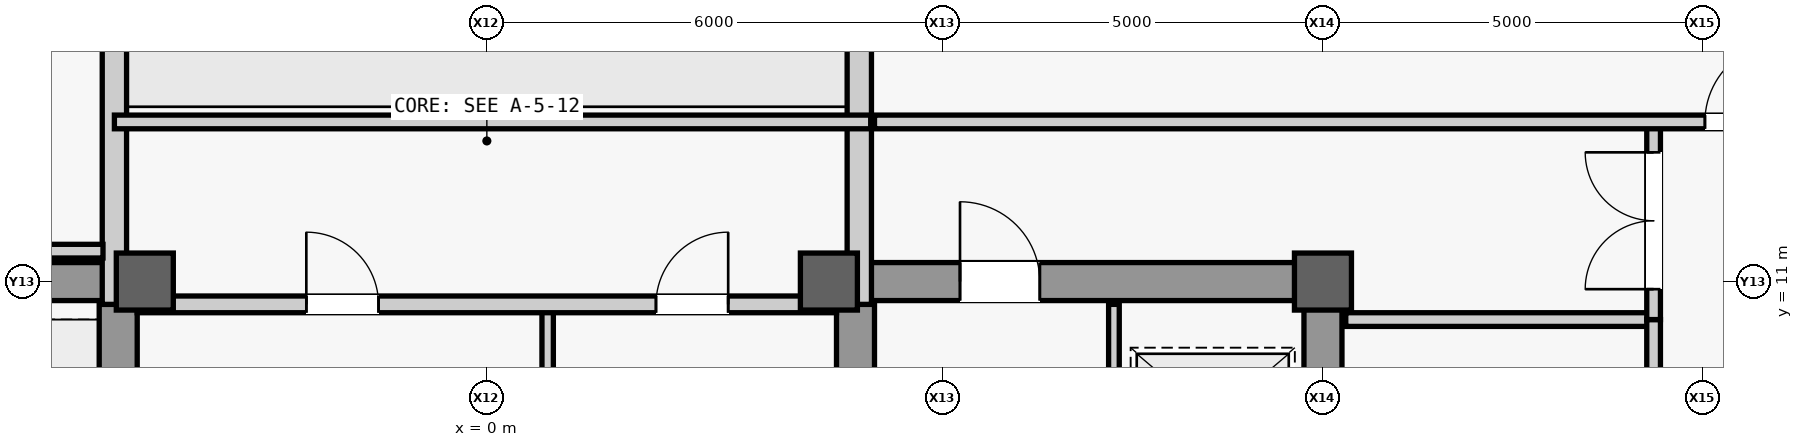
"""IFC4 building model, lengths in metres.
Left out: names, types, materials, properties, quantities, classifications, styles, units other than length and angle.
Written with IfcOpenShell. Run it as: python <this file> out.ifc"""

import sys

from ifc_helpers import new_model, si_unit, direction, frame, frame_2d, origin, origin_2d, place, context, subcontext, project, spatial, rectangle, extrude, source, transform, mapped, element, fill, save


model = new_model("IFC4")
c1 = context("Model", 3, precision=1e-05, world=origin(), true_north=direction((0.0, 1.0)))
c2 = subcontext(c1, "Body", "Model", "MODEL_VIEW")
j1 = project(units=[si_unit("LENGTHUNIT", "METRE"), si_unit("PLANEANGLEUNIT", "RADIAN")], contexts=[c1])
p1 = place(None, origin())
s1 = spatial("IfcSite", under=j1, at=p1, CompositionType="ELEMENT")
p2 = place(p1, origin())
s2 = spatial("IfcBuilding", under=s1, at=p2, CompositionType="ELEMENT")
p3 = place(p2, frame((0.0, 0.0, 346.3)))
s3 = spatial("IfcBuildingStorey", under=s2, at=p3, CompositionType="ELEMENT", Elevation=346.3)
m1 = source(origin(), c2, "Body", "SweptSolid", [
    extrude(rectangle(XDim=22.0, YDim=0.5, at=frame_2d((11.0, 0.0))), origin(), (0.0, 0.0, 1.0), 3.74),
])
p4 = place(p3, frame((11.0, -11.0, 0.0), z_axis=(0.0, 0.0, 1.0), x_axis=(0.0, 1.0, 0.0)))
e1 = element("IfcWall", 1, at=p4, inside=s3, PredefinedType="SHEAR", context=c2, shape_type="MappedRepresentation", body=[
    mapped(m1, transform((0.0, 0.0, 0.0), scale=1.0)),
])
m2 = source(origin(), c2, "Body", "SweptSolid", [
    extrude(rectangle(XDim=1.1, YDim=2.2, at=frame_2d((0.55, 1.1))), frame((0.0, 0.26, 0.0), z_axis=(0.0, -1.0, 0.0), x_axis=(1.0, 0.0, 0.0)), (0.0, 0.0, 1.0), 0.52),
])
p5 = place(p4, frame((0.8, 0.0, 0.0)))
e2 = element("IfcOpeningElement", 2, at=p5, cuts=e1, PredefinedType="OPENING", context=c2, shape_type="MappedRepresentation", body=[
    mapped(m2, transform((0.0, 0.0, 0.0), scale=1.0)),
])
m3 = source(origin(), c2, "Body", "SweptSolid", [
    extrude(rectangle(XDim=0.9, YDim=2.15, at=frame_2d((0.45, 1.075))), frame((0.0, 0.26, 0.0), z_axis=(0.0, -1.0, 0.0), x_axis=(1.0, 0.0, 0.0)), (0.0, 0.0, 1.0), 0.52),
])
p6 = place(p4, frame((6.2, 0.0, 0.0)))
e3 = element("IfcOpeningElement", 3, at=p6, cuts=e1, PredefinedType="OPENING", context=c2, shape_type="MappedRepresentation", body=[
    mapped(m3, transform((0.0, 0.0, 0.0), scale=1.0)),
])
p7 = place(p4, frame((8.05, 0.0, 0.0)))
e4 = element("IfcOpeningElement", 4, at=p7, cuts=e1, PredefinedType="OPENING", context=c2, shape_type="MappedRepresentation", body=[
    mapped(m3, transform((0.0, 0.0, 0.0), scale=1.0)),
])
m4 = source(origin(), c2, "Body", "SweptSolid", [
    extrude(rectangle(XDim=1.2, YDim=2.3, at=frame_2d((0.6, 1.15))), frame((0.0, 0.26, 0.0), z_axis=(0.0, -1.0, 0.0), x_axis=(1.0, 0.0, 0.0)), (0.0, 0.0, 1.0), 0.52),
])
p8 = place(p4, frame((17.6, 0.0, 0.0)))
e5 = element("IfcOpeningElement", 5, at=p8, cuts=e1, PredefinedType="OPENING", context=c2, shape_type="MappedRepresentation", body=[
    mapped(m4, transform((0.0, 0.0, 0.0), scale=1.0)),
])
p9 = place(p4, frame((19.6, 0.0, 0.0)))
e6 = element("IfcOpeningElement", 6, at=p9, cuts=e1, PredefinedType="OPENING", context=c2, shape_type="MappedRepresentation", body=[
    mapped(m4, transform((0.0, 0.0, 0.0), scale=1.0)),
])
m5 = source(origin(), c2, "Body", "SweptSolid", [
    extrude(rectangle(XDim=1.3, YDim=2.3, at=frame_2d((0.65, 1.15))), frame((0.0, 0.26, 0.0), z_axis=(0.0, -1.0, 0.0), x_axis=(1.0, 0.0, 0.0)), (0.0, 0.0, 1.0), 0.52),
])
p10 = place(p4, frame((2.7, 0.0, 0.0)))
e7 = element("IfcOpeningElement", 7, at=p10, cuts=e1, PredefinedType="OPENING", context=c2, shape_type="MappedRepresentation", body=[
    mapped(m5, transform((0.0, 0.0, 0.0), scale=1.0)),
])
p11 = place(p4, frame((13.35, 0.0, 0.0)))
e8 = element("IfcOpeningElement", 8, at=p11, cuts=e1, PredefinedType="OPENING", context=c2, shape_type="MappedRepresentation", body=[
    mapped(m5, transform((0.0, 0.0, 0.0), scale=1.0)),
])
m6 = source(origin(), c2, "Body", "SweptSolid", [
    extrude(rectangle(XDim=21.4, YDim=0.5, at=frame_2d((10.7, 0.0))), origin(), (0.0, 0.0, 1.0), 3.74),
])
for number, where, z_axis, x_axis in (
    (9, (-4.85, -10.7, 0.0), (0.0, 0.0, 1.0), (0.0, 1.0, 0.0)),
    (10, (4.85, -10.7, 0.0), (0.0, 0.0, 1.0), (0.0, 1.0, 0.0)),
):
    element("IfcWall", number, at=place(p3, frame(where, z_axis=z_axis, x_axis=x_axis)), inside=s3, PredefinedType="SHEAR", context=c2, shape_type="MappedRepresentation", body=[
        mapped(m6, transform((0.0, 0.0, 0.0), scale=1.0)),
    ])
m7 = source(origin(), c2, "Body", "SweptSolid", [
    extrude(rectangle(XDim=5.9, YDim=0.5, at=frame_2d((2.95, 0.0))), origin(), (0.0, 0.0, 1.0), 3.74),
])
p12 = place(p3, frame((-10.75, 11.0, 0.0), z_axis=(0.0, 0.0, 1.0), x_axis=(1.0, 0.0, 0.0)))
e11 = element("IfcWall", 11, at=p12, inside=s3, PredefinedType="SHEAR", context=c2, shape_type="MappedRepresentation", body=[
    mapped(m7, transform((0.0, 0.0, 0.0), scale=1.0)),
])
p13 = place(p3, frame((4.85, 11.0, 0.0), z_axis=(0.0, 0.0, 1.0), x_axis=(1.0, 0.0, 0.0)))
e12 = element("IfcWall", 12, at=p13, inside=s3, PredefinedType="SHEAR", context=c2, shape_type="MappedRepresentation", body=[
    mapped(m7, transform((0.0, 0.0, 0.0), scale=1.0)),
])
m8 = source(origin(), c2, "Body", "SweptSolid", [
    extrude(rectangle(XDim=1.05, YDim=2.2, at=frame_2d((0.525, 1.1))), frame((0.0, 0.26, 0.0), z_axis=(0.0, -1.0, 0.0), x_axis=(1.0, 0.0, 0.0)), (0.0, 0.0, 1.0), 0.52),
])
p14 = place(p13, frame((1.375, 0.0, 0.0)))
e13 = element("IfcOpeningElement", 13, at=p14, cuts=e12, PredefinedType="OPENING", context=c2, shape_type="MappedRepresentation", body=[
    mapped(m8, transform((0.0, 0.0, 0.0), scale=1.0)),
])
m9 = source(origin(), c2, "Body", "SweptSolid", [
    extrude(rectangle(XDim=0.75, YDim=0.75, at=origin_2d()), origin(), (0.0, 0.0, 1.0), 4.0),
])
for number, where, z_axis, x_axis in (
    (14, (-4.5, 11.0, 0.0), (0.0, 0.0, 1.0), (1.0, 0.0, 0.0)),
    (15, (4.5, 11.0, 0.0), (0.0, 0.0, 1.0), (1.0, 0.0, 0.0)),
    (16, (11.0, 11.0, 0.0), (0.0, 0.0, 1.0), (1.0, 0.0, 0.0)),
):
    element("IfcColumn", number, at=place(p3, frame(where, z_axis=z_axis, x_axis=x_axis)), inside=s3, PredefinedType="COLUMN", context=c2, shape_type="MappedRepresentation", body=[
        mapped(m9, transform((0.0, 0.0, 0.0), scale=1.0)),
    ])
m10 = source(origin(), c2, "Body", "SweptSolid", [
    extrude(rectangle(XDim=14.98, YDim=0.32, at=frame_2d((7.49, 0.0))), origin(), (0.0, 0.0, 1.0), 3.045),
])
for number, where, z_axis, x_axis in (
    (17, (-4.9, 10.7, 0.0), (0.0, 0.0, 1.0), (0.0, 1.0, 0.0)),
    (18, (4.9, 10.7, 0.0), (0.0, 0.0, 1.0), (0.0, 1.0, 0.0)),
):
    element("IfcWall", number, at=place(p3, frame(where, z_axis=z_axis, x_axis=x_axis)), inside=s3, PredefinedType="STANDARD", context=c2, shape_type="MappedRepresentation", body=[
        mapped(m10, transform((0.0, 0.0, 0.0), scale=1.0)),
    ])
m11 = source(origin(), c2, "Body", "SweptSolid", [
    extrude(rectangle(XDim=9.4, YDim=0.14, at=frame_2d((4.7, 0.0))), origin(), (0.0, 0.0, 1.0), 3.74),
])
p15 = place(p3, frame((8.25, 1.3, 0.0), z_axis=(0.0, 0.0, 1.0), x_axis=(0.0, 1.0, 0.0)))
e19 = element("IfcWall", 19, at=p15, inside=s3, PredefinedType="PARTITIONING", context=c2, shape_type="MappedRepresentation", body=[
    mapped(m11, transform((0.0, 0.0, 0.0), scale=1.0)),
])
m12 = source(origin(), c2, "Body", "SweptSolid", [
    extrude(rectangle(XDim=4.05, YDim=0.18, at=frame_2d((2.025, 0.0))), origin(), (0.0, 0.0, 1.0), 3.74),
])
p16 = place(p3, frame((11.3, 10.5, 0.0), z_axis=(0.0, 0.0, 1.0), x_axis=(1.0, 0.0, 0.0)))
e20 = element("IfcWall", 20, at=p16, inside=s3, PredefinedType="PARTITIONING", context=c2, shape_type="MappedRepresentation", body=[
    mapped(m12, transform((0.0, 0.0, 0.0), scale=1.0)),
])
m13 = source(origin(), c2, "Body", "SweptSolid", [
    extrude(rectangle(XDim=16.6, YDim=0.18, at=frame_2d((8.3, 0.0))), origin(), (0.0, 0.0, 1.0), 3.74),
])
p17 = place(p3, frame((15.35, -6.1, 0.0), z_axis=(0.0, 0.0, 1.0), x_axis=(0.0, 1.0, 0.0)))
e21 = element("IfcWall", 21, at=p17, inside=s3, PredefinedType="PARTITIONING", context=c2, shape_type="MappedRepresentation", body=[
    mapped(m13, transform((0.0, 0.0, 0.0), scale=1.0)),
])
m14 = source(origin(), c2, "Body", "SweptSolid", [
    extrude(rectangle(XDim=1.8, YDim=2.25, at=frame_2d((0.9, 1.125))), frame((0.0, 0.1, 0.0), z_axis=(0.0, -1.0, 0.0), x_axis=(1.0, 0.0, 0.0)), (0.0, 0.0, 1.0), 0.2),
])
p18 = place(p17, frame((2.7, 0.0, 0.0)))
e22 = element("IfcOpeningElement", 22, at=p18, cuts=e21, PredefinedType="OPENING", context=c2, shape_type="MappedRepresentation", body=[
    mapped(m14, transform((0.0, 0.0, 0.0), scale=1.0)),
])
p19 = place(p17, frame((13.0, 0.0, 0.0)))
e23 = element("IfcOpeningElement", 23, at=p19, cuts=e21, PredefinedType="OPENING", context=c2, shape_type="MappedRepresentation", body=[
    mapped(m14, transform((0.0, 0.0, 0.0), scale=1.0)),
])
m15 = source(origin(), c2, "Body", "SweptSolid", [
    extrude(rectangle(XDim=5.4, YDim=0.15, at=frame_2d((2.7, 0.0))), origin(), (0.0, 0.0, 1.0), 3.74),
])
p20 = place(p3, frame((0.8, 5.3, 0.0), z_axis=(0.0, 0.0, 1.0), x_axis=(0.0, 1.0, 0.0)))
e24 = element("IfcWall", 24, at=p20, inside=s3, PredefinedType="PARTITIONING", context=c2, shape_type="MappedRepresentation", body=[
    mapped(m15, transform((0.0, 0.0, 0.0), scale=1.0)),
])
m16 = source(origin(), c2, "Body", "SweptSolid", [
    extrude(rectangle(XDim=9.2, YDim=0.22, at=frame_2d((4.6, 0.0))), origin(), (0.0, 0.0, 1.0), 3.74),
])
p21 = place(p3, frame((-4.6, 10.7, 0.0), z_axis=(0.0, 0.0, 1.0), x_axis=(1.0, 0.0, 0.0)))
e25 = element("IfcWall", 25, at=p21, inside=s3, PredefinedType="PARTITIONING", context=c2, shape_type="MappedRepresentation", body=[
    mapped(m16, transform((0.0, 0.0, 0.0), scale=1.0)),
])
m17 = source(origin(), c2, "Body", "SweptSolid", [
    extrude(rectangle(XDim=0.95, YDim=2.15, at=frame_2d((0.475, 1.075))), frame((0.0, 0.12, 0.0), z_axis=(0.0, -1.0, 0.0), x_axis=(1.0, 0.0, 0.0)), (0.0, 0.0, 1.0), 0.24),
])
p22 = place(p21, frame((2.225, 0.0, 0.0)))
e26 = element("IfcOpeningElement", 26, at=p22, cuts=e25, PredefinedType="OPENING", context=c2, shape_type="MappedRepresentation", body=[
    mapped(m17, transform((0.0, 0.0, 0.0), scale=1.0)),
])
p23 = place(p21, frame((6.825, 0.0, 0.0)))
e27 = element("IfcOpeningElement", 27, at=p23, cuts=e25, PredefinedType="OPENING", context=c2, shape_type="MappedRepresentation", body=[
    mapped(m17, transform((0.0, 0.0, 0.0), scale=1.0)),
])
m18 = source(origin(), c2, "Body", "SweptSolid", [
    extrude(rectangle(XDim=9.95, YDim=0.18, at=frame_2d((4.975, 0.0))), origin(), (0.0, 0.0, 1.0), 3.74),
])
p24 = place(p3, frame((-4.9, 13.1, 0.0), z_axis=(0.0, 0.0, 1.0), x_axis=(1.0, 0.0, 0.0)))
e28 = element("IfcWall", 28, at=p24, inside=s3, PredefinedType="PARTITIONING", context=c2, shape_type="MappedRepresentation", body=[
    mapped(m18, transform((0.0, 0.0, 0.0), scale=1.0)),
])
m19 = source(origin(), c2, "Body", "SweptSolid", [
    extrude(rectangle(XDim=2.6, YDim=0.18, at=frame_2d((1.3, 0.0))), origin(), (0.0, 0.0, 1.0), 3.74),
])
p25 = place(p3, frame((15.35, 10.5, 0.0), z_axis=(0.0, 0.0, 1.0), x_axis=(0.0, 1.0, 0.0)))
e29 = element("IfcWall", 29, at=p25, inside=s3, PredefinedType="PARTITIONING", context=c2, shape_type="MappedRepresentation", body=[
    mapped(m19, transform((0.0, 0.0, 0.0), scale=1.0)),
])
p26 = place(p25, frame((0.4, 0.0, 0.0)))
e30 = element("IfcOpeningElement", 30, at=p26, cuts=e29, PredefinedType="OPENING", context=c2, shape_type="MappedRepresentation", body=[
    mapped(m14, transform((0.0, 0.0, 0.0), scale=1.0)),
])
m20 = source(origin(), c2, "Body", "SweptSolid", [
    extrude(rectangle(XDim=12.7, YDim=0.18, at=frame_2d((6.35, 0.0))), origin(), (0.0, 0.0, 1.0), 2.79),
])
p27 = place(p3, frame((-17.75, 11.4, 0.0), z_axis=(0.0, 0.0, 1.0), x_axis=(1.0, 0.0, 0.0)))
e31 = element("IfcWall", 31, at=p27, inside=s3, PredefinedType="PARTITIONING", context=c2, shape_type="MappedRepresentation", body=[
    mapped(m20, transform((0.0, 0.0, 0.0), scale=1.0)),
])
m21 = source(origin(), c2, "Body", "SweptSolid", [
    extrude(rectangle(XDim=1.05, YDim=2.2, at=frame_2d((0.525, 1.1))), frame((0.0, 0.1, 0.0), z_axis=(0.0, -1.0, 0.0), x_axis=(1.0, 0.0, 0.0)), (0.0, 0.0, 1.0), 0.2),
])
p28 = place(p27, frame((0.675, 0.0, 0.0)))
e32 = element("IfcOpeningElement", 32, at=p28, cuts=e31, PredefinedType="OPENING", context=c2, shape_type="MappedRepresentation", body=[
    mapped(m21, transform((0.0, 0.0, 0.0), scale=1.0)),
])
m22 = source(origin(), c2, "Body", "SweptSolid", [
    extrude(rectangle(XDim=12.65, YDim=0.18, at=frame_2d((6.325, 0.0))), origin(), (0.0, 0.0, 1.0), 3.74),
])
p29 = place(p3, frame((5.1, 13.1, 0.0), z_axis=(0.0, 0.0, 1.0), x_axis=(1.0, 0.0, 0.0)))
e33 = element("IfcWall", 33, at=p29, inside=s3, PredefinedType="PARTITIONING", context=c2, shape_type="MappedRepresentation", body=[
    mapped(m22, transform((0.0, 0.0, 0.0), scale=1.0)),
])
p30 = place(p29, frame((10.925, 0.0, 0.0)))
e34 = element("IfcOpeningElement", 34, at=p30, cuts=e33, PredefinedType="OPENING", context=c2, shape_type="MappedRepresentation", body=[
    mapped(m21, transform((0.0, 0.0, 0.0), scale=1.0)),
])
m23 = source(origin(), c2, "Body", "SweptSolid", [
    extrude(rectangle(XDim=1.05, YDim=2.2, at=frame_2d((0.525, 1.1))), frame((0.0, 0.025, 0.0), z_axis=(0.0, -1.0, 0.0), x_axis=(1.0, 0.0, 0.0)), (0.0, 0.0, 1.0), 0.05),
])
p31 = place(p14, origin())
e35 = element("IfcDoor", 35, at=p31, inside=s3, OperationType="SINGLE_SWING_LEFT", PredefinedType="DOOR", context=c2, shape_type="MappedRepresentation", body=[
    mapped(m23, transform((0.0, 0.0, 0.0), scale=1.0)),
])
fill(e13, e35)
m24 = source(origin(), c2, "Body", "SweptSolid", [
    extrude(rectangle(XDim=0.95, YDim=2.15, at=frame_2d((0.475, 1.075))), frame((0.0, 0.025, 0.0), z_axis=(0.0, -1.0, 0.0), x_axis=(1.0, 0.0, 0.0)), (0.0, 0.0, 1.0), 0.05),
])
p32 = place(p22, origin())
e36 = element("IfcDoor", 36, at=p32, inside=s3, OperationType="SINGLE_SWING_LEFT", PredefinedType="DOOR", context=c2, shape_type="MappedRepresentation", body=[
    mapped(m24, transform((0.0, 0.0, 0.0), scale=1.0)),
])
fill(e26, e36)
p33 = place(p23, origin())
e37 = element("IfcDoor", 37, at=p33, inside=s3, OperationType="SINGLE_SWING_RIGHT", PredefinedType="DOOR", context=c2, shape_type="MappedRepresentation", body=[
    mapped(m24, transform((0.0, 0.0, 0.0), scale=1.0)),
])
fill(e27, e37)
m25 = source(origin(), c2, "Body", "SweptSolid", [
    extrude(rectangle(XDim=1.8, YDim=2.25, at=frame_2d((0.9, 1.125))), frame((0.0, 0.025, 0.0), z_axis=(0.0, -1.0, 0.0), x_axis=(1.0, 0.0, 0.0)), (0.0, 0.0, 1.0), 0.05),
])
p34 = place(p26, origin())
e38 = element("IfcDoor", 38, at=p34, inside=s3, OperationType="DOUBLE_DOOR_SINGLE_SWING", PredefinedType="DOOR", context=c2, shape_type="MappedRepresentation", body=[
    mapped(m25, transform((0.0, 0.0, 0.0), scale=1.0)),
])
fill(e30, e38)
p35 = place(p30, origin())
e39 = element("IfcDoor", 39, at=p35, inside=s3, OperationType="SINGLE_SWING_RIGHT", PredefinedType="DOOR", context=c2, shape_type="MappedRepresentation", body=[
    mapped(m23, transform((0.0, 0.0, 0.0), scale=1.0)),
])
fill(e34, e39)
save(model, sys.argv[1])
